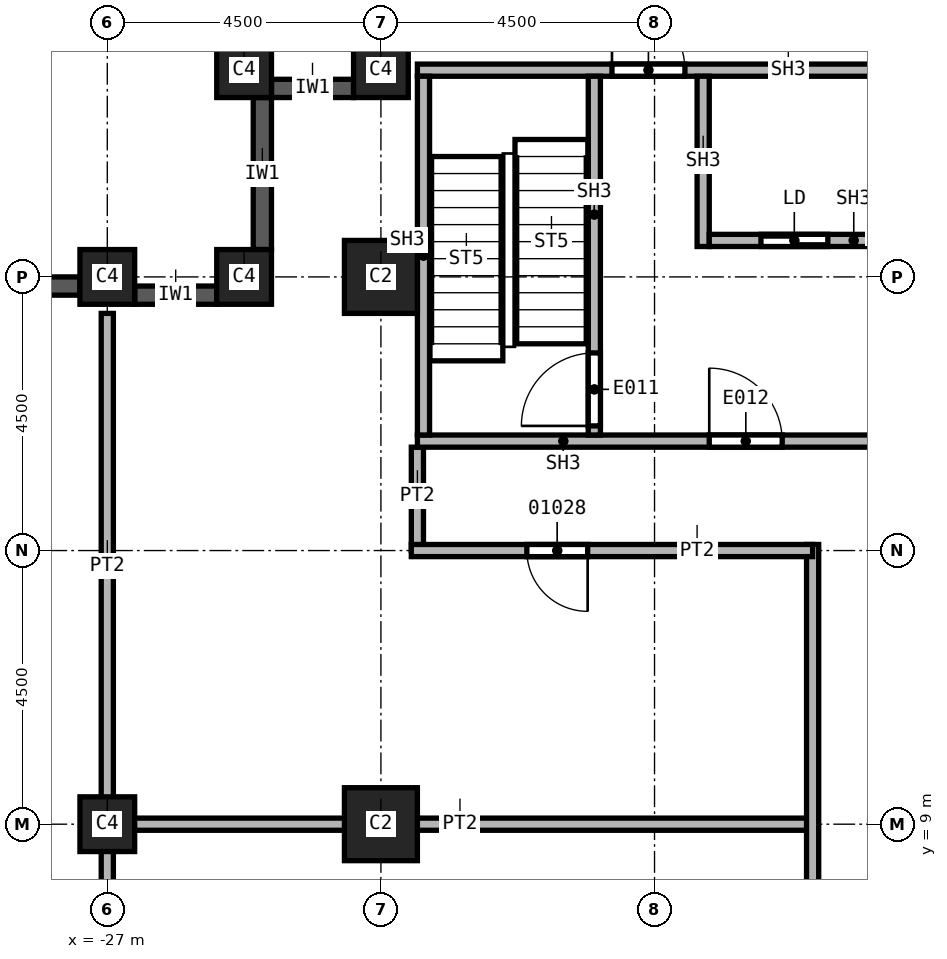
"""IFC4 building model, lengths in metres.
Left out: names, types, materials, properties, quantities, classifications, styles, units other than length and angle.
Written with IfcOpenShell. Run it as: python <this file> out.ifc"""

import sys

from ifc_helpers import new_model, si_unit, direction, frame, frame_2d, origin, origin_2d, place, context, subcontext, project, spatial, rectangle, extrude, element, fill, save


model = new_model("IFC4")
c1 = context("Model", 3, precision=1e-05, world=origin(), true_north=direction((0.0, 1.0)))
c2 = subcontext(c1, "Body", "Model", "MODEL_VIEW")
j1 = project(units=[si_unit("LENGTHUNIT", "METRE"), si_unit("PLANEANGLEUNIT", "RADIAN")], contexts=[c1])
p1 = place(None, origin())
s1 = spatial("IfcSite", under=j1, at=p1, CompositionType="ELEMENT")
p2 = place(p1, origin())
s2 = spatial("IfcBuilding", under=s1, at=p2, CompositionType="ELEMENT")
p3 = place(p2, frame((0.0, 0.0, 68.0)))
s3 = spatial("IfcBuildingStorey", under=s2, at=p3, CompositionType="ELEMENT", Elevation=68.0)
for number, where, z_axis, x_axis in (
    (1, (-22.5, 9.0, 0.0), (0.0, 0.0, 1.0), (1.0, 0.0, 0.0)),
    (2, (-22.5, 18.0, 0.0), (0.0, 0.0, 1.0), (1.0, 0.0, 0.0)),
):
    element("IfcColumn", number, at=place(p3, frame(where, z_axis=z_axis, x_axis=x_axis)), inside=s3, PredefinedType="COLUMN", context=c2, shape_type="SweptSolid", body=[
        extrude(rectangle(XDim=1.2, YDim=1.2, at=origin_2d()), origin(), (0.0, 0.0, 1.0), 3.7),
    ])
for number, where, z_axis, x_axis in (
    (3, (-27.0, 9.0, 0.0), (0.0, 0.0, 1.0), (1.0, 0.0, 0.0)),
    (4, (-27.0, 18.0, 0.0), (0.0, 0.0, 1.0), (1.0, 0.0, 0.0)),
    (5, (-22.5, 21.4, 0.0), (0.0, 0.0, 1.0), (1.0, 0.0, 0.0)),
    (6, (-24.75, 21.4, 0.0), (0.0, 0.0, 1.0), (1.0, 0.0, 0.0)),
    (7, (-24.75, 18.0, 0.0), (0.0, 0.0, 1.0), (1.0, 0.0, 0.0)),
):
    element("IfcColumn", number, at=place(p3, frame(where, z_axis=z_axis, x_axis=x_axis)), inside=s3, PredefinedType="COLUMN", context=c2, shape_type="SweptSolid", body=[
        extrude(rectangle(XDim=0.9, YDim=0.9, at=origin_2d()), origin(), (0.0, 0.0, 1.0), 3.7),
    ])
p4 = place(p3, frame((-22.95, 21.1, 0.0), z_axis=(0.0, 0.0, 1.0), x_axis=(-1.0, 0.0, 0.0)))
e8 = element("IfcWall", 8, at=p4, inside=s3, PredefinedType="SOLIDWALL", context=c2, shape_type="SweptSolid", body=[
    extrude(rectangle(XDim=1.35, YDim=0.3, at=frame_2d((0.675, 0.0))), origin(), (0.0, 0.0, 1.0), 3.1),
])
p5 = place(p3, frame((-24.45, 20.95, 0.0), z_axis=(0.0, 0.0, 1.0), x_axis=(0.0, -1.0, 0.0)))
e9 = element("IfcWall", 9, at=p5, inside=s3, PredefinedType="SOLIDWALL", context=c2, shape_type="SweptSolid", body=[
    extrude(rectangle(XDim=2.5, YDim=0.3, at=frame_2d((1.25, 0.0))), origin(), (0.0, 0.0, 1.0), 3.1),
])
p6 = place(p3, frame((-25.2, 17.7, 0.0), z_axis=(0.0, 0.0, 1.0), x_axis=(-1.0, 0.0, 0.0)))
e10 = element("IfcWall", 10, at=p6, inside=s3, PredefinedType="SOLIDWALL", context=c2, shape_type="SweptSolid", body=[
    extrude(rectangle(XDim=1.35, YDim=0.3, at=frame_2d((0.675, 0.0))), origin(), (0.0, 0.0, 1.0), 3.1),
])
p7 = place(p3, frame((-27.45, 17.85, 0.0), z_axis=(0.0, 0.0, 1.0), x_axis=(-1.0, 0.0, 0.0)))
e11 = element("IfcWall", 11, at=p7, inside=s3, PredefinedType="SOLIDWALL", context=c2, shape_type="SweptSolid", body=[
    extrude(rectangle(XDim=3.6, YDim=0.3, at=frame_2d((1.8, 0.0))), origin(), (0.0, 0.0, 1.0), 3.1),
])
p8 = place(p7, frame((0.6, 0.0, 0.8)))
e12 = element("IfcOpeningElement", 12, at=p8, cuts=e11, PredefinedType="OPENING", context=c2, shape_type="SweptSolid", body=[
    extrude(rectangle(XDim=2.4, YDim=1.95, at=frame_2d((1.2, 0.975))), frame((0.0, 0.15, 0.0), z_axis=(0.0, -1.0, 0.0), x_axis=(1.0, 0.0, 0.0)), (0.0, 0.0, 1.0), 0.3),
])
p9 = place(p3, frame((-27.1, 9.0, 0.0), z_axis=(0.0, 0.0, 1.0), x_axis=(1.0, 0.0, 0.0)))
e13 = element("IfcWall", 13, at=p9, inside=s3, PredefinedType="PARTITIONING", context=c2, shape_type="SweptSolid", body=[
    extrude(rectangle(XDim=11.7, YDim=0.2, at=frame_2d((5.85, 0.0))), origin(), (0.0, 0.0, 1.0), 3.7),
])
p10 = place(p3, frame((-27.0, 3.75, 0.0), z_axis=(0.0, 0.0, 1.0), x_axis=(0.0, 1.0, 0.0)))
e14 = element("IfcWall", 14, at=p10, inside=s3, PredefinedType="PARTITIONING", context=c2, shape_type="SweptSolid", body=[
    extrude(rectangle(XDim=13.65, YDim=0.2, at=frame_2d((6.825, 0.0))), origin(), (0.0, 0.0, 1.0), 3.7),
])
p11 = place(p3, frame((-21.9, 13.5, 0.0), z_axis=(0.0, 0.0, 1.0), x_axis=(0.0, 1.0, 0.0)))
e15 = element("IfcWall", 15, at=p11, inside=s3, PredefinedType="PARTITIONING", context=c2, shape_type="SweptSolid", body=[
    extrude(rectangle(XDim=1.7, YDim=0.2, at=frame_2d((0.85, 0.0))), origin(), (0.0, 0.0, 1.0), 3.7),
])
p12 = place(p3, frame((-15.4, 3.65, 0.0), z_axis=(0.0, 0.0, 1.0), x_axis=(0.0, 1.0, 0.0)))
e16 = element("IfcWall", 16, at=p12, inside=s3, PredefinedType="PARTITIONING", context=c2, shape_type="SweptSolid", body=[
    extrude(rectangle(XDim=9.95, YDim=0.2, at=frame_2d((4.975, 0.0))), origin(), (0.0, 0.0, 1.0), 3.7),
])
p13 = place(p3, frame((-15.4, 13.5, 0.0), z_axis=(0.0, 0.0, 1.0), x_axis=(-1.0, 0.0, 0.0)))
e17 = element("IfcWall", 17, at=p13, inside=s3, PredefinedType="PARTITIONING", context=c2, shape_type="SweptSolid", body=[
    extrude(rectangle(XDim=6.6, YDim=0.2, at=frame_2d((3.3, 0.0))), origin(), (0.0, 0.0, 1.0), 3.7),
])
p14 = place(p13, frame((3.7, 0.0, 0.0)))
e18 = element("IfcOpeningElement", 18, at=p14, cuts=e17, PredefinedType="OPENING", context=c2, shape_type="SweptSolid", body=[
    extrude(rectangle(XDim=1.0, YDim=2.1, at=frame_2d((0.5, 1.05))), frame((0.0, 0.1, 0.0), z_axis=(0.0, -1.0, 0.0), x_axis=(1.0, 0.0, 0.0)), (0.0, 0.0, 1.0), 0.2),
])
p15 = place(p3, frame((-21.9, 15.3, 0.0), z_axis=(0.0, 0.0, 1.0), x_axis=(1.0, 0.0, 0.0)))
e19 = element("IfcWall", 19, at=p15, inside=s3, PredefinedType="SOLIDWALL", context=c2, shape_type="SweptSolid", body=[
    extrude(rectangle(XDim=8.275, YDim=0.2, at=frame_2d((4.137, 0.0))), origin(), (0.0, 0.0, 1.0), 3.7),
])
p16 = place(p15, frame((4.8, 0.0, 0.0)))
e20 = element("IfcOpeningElement", 20, at=p16, cuts=e19, PredefinedType="OPENING", context=c2, shape_type="SweptSolid", body=[
    extrude(rectangle(XDim=1.2, YDim=2.1, at=frame_2d((0.6, 1.05))), frame((0.0, 0.1, 0.0), z_axis=(0.0, -1.0, 0.0), x_axis=(1.0, 0.0, 0.0)), (0.0, 0.0, 1.0), 0.2),
])
p17 = place(p3, frame((-21.9, 21.4, 0.0), z_axis=(0.0, 0.0, 1.0), x_axis=(1.0, 0.0, 0.0)))
e21 = element("IfcWall", 21, at=p17, inside=s3, PredefinedType="SOLIDWALL", context=c2, shape_type="SweptSolid", body=[
    extrude(rectangle(XDim=7.8, YDim=0.2, at=frame_2d((3.9, 0.0))), origin(), (0.0, 0.0, 1.0), 3.7),
])
p18 = place(p17, frame((3.2, 0.0, 0.0)))
e22 = element("IfcOpeningElement", 22, at=p18, cuts=e21, PredefinedType="OPENING", context=c2, shape_type="SweptSolid", body=[
    extrude(rectangle(XDim=1.2, YDim=2.1, at=frame_2d((0.6, 1.05))), frame((0.0, 0.1, 0.0), z_axis=(0.0, -1.0, 0.0), x_axis=(1.0, 0.0, 0.0)), (0.0, 0.0, 1.0), 0.2),
])
p19 = place(p3, frame((-21.8, 15.4, 0.0), z_axis=(0.0, 0.0, 1.0), x_axis=(0.0, 1.0, 0.0)))
e23 = element("IfcWall", 23, at=p19, inside=s3, PredefinedType="SOLIDWALL", context=c2, shape_type="SweptSolid", body=[
    extrude(rectangle(XDim=5.9, YDim=0.2, at=frame_2d((2.95, 0.0))), origin(), (0.0, 0.0, 1.0), 3.7),
])
p20 = place(p3, frame((-18.99, 15.4, 0.0), z_axis=(0.0, 0.0, 1.0), x_axis=(0.0, 1.0, 0.0)))
e24 = element("IfcWall", 24, at=p20, inside=s3, PredefinedType="SOLIDWALL", context=c2, shape_type="SweptSolid", body=[
    extrude(rectangle(XDim=5.9, YDim=0.2, at=frame_2d((2.95, 0.0))), origin(), (0.0, 0.0, 1.0), 3.7),
])
p21 = place(p20, frame((0.15, 0.0, 0.0)))
e25 = element("IfcOpeningElement", 25, at=p21, cuts=e24, PredefinedType="OPENING", context=c2, shape_type="SweptSolid", body=[
    extrude(rectangle(XDim=1.2, YDim=2.1, at=frame_2d((0.6, 1.05))), frame((0.0, 0.1, 0.0), z_axis=(0.0, -1.0, 0.0), x_axis=(1.0, 0.0, 0.0)), (0.0, 0.0, 1.0), 0.2),
])
p22 = place(p3, frame((-17.2, 18.5, 0.0), z_axis=(0.0, 0.0, 1.0), x_axis=(0.0, 1.0, 0.0)))
e26 = element("IfcWall", 26, at=p22, inside=s3, PredefinedType="SOLIDWALL", context=c2, shape_type="SweptSolid", body=[
    extrude(rectangle(XDim=2.8, YDim=0.2, at=frame_2d((1.4, 0.0))), origin(), (0.0, 0.0, 1.0), 3.7),
])
p23 = place(p3, frame((-17.1, 18.6, 0.0), z_axis=(0.0, 0.0, 1.0), x_axis=(1.0, 0.0, 0.0)))
e27 = element("IfcWall", 27, at=p23, inside=s3, PredefinedType="SOLIDWALL", context=c2, shape_type="SweptSolid", body=[
    extrude(rectangle(XDim=2.8, YDim=0.2, at=frame_2d((1.4, 0.0))), origin(), (0.0, 0.0, 1.0), 3.7),
])
p24 = place(p23, frame((0.85, 0.0, 0.0)))
e28 = element("IfcOpeningElement", 28, at=p24, cuts=e27, PredefinedType="OPENING", context=c2, shape_type="SweptSolid", body=[
    extrude(rectangle(XDim=1.1, YDim=2.1, at=frame_2d((0.55, 1.05))), frame((0.0, 0.1, 0.0), z_axis=(0.0, -1.0, 0.0), x_axis=(1.0, 0.0, 0.0)), (0.0, 0.0, 1.0), 0.2),
])
p25 = place(p14, origin())
e29 = element("IfcDoor", 29, at=p25, inside=s3, OperationType="SINGLE_SWING_LEFT", PredefinedType="DOOR", context=c2, shape_type="SweptSolid", body=[
    extrude(rectangle(XDim=1.0, YDim=2.1, at=frame_2d((0.5, 1.05))), frame((0.0, 0.025, 0.0), z_axis=(0.0, -1.0, 0.0), x_axis=(1.0, 0.0, 0.0)), (0.0, 0.0, 1.0), 0.05),
])
fill(e18, e29)
p26 = place(p21, origin())
e30 = element("IfcDoor", 30, at=p26, inside=s3, OperationType="SINGLE_SWING_LEFT", PredefinedType="DOOR", context=c2, shape_type="SweptSolid", body=[
    extrude(rectangle(XDim=1.2, YDim=2.1, at=frame_2d((0.6, 1.05))), frame((0.0, 0.025, 0.0), z_axis=(0.0, -1.0, 0.0), x_axis=(1.0, 0.0, 0.0)), (0.0, 0.0, 1.0), 0.05),
])
fill(e25, e30)
p27 = place(p24, origin())
e31 = element("IfcDoor", 31, at=p27, inside=s3, OperationType="SLIDING_TO_LEFT", PredefinedType="DOOR", context=c2, shape_type="SweptSolid", body=[
    extrude(rectangle(XDim=1.1, YDim=2.1, at=frame_2d((0.55, 1.05))), frame((0.0, 0.025, 0.0), z_axis=(0.0, -1.0, 0.0), x_axis=(1.0, 0.0, 0.0)), (0.0, 0.0, 1.0), 0.05),
])
fill(e28, e31)
p28 = place(p16, origin())
e32 = element("IfcDoor", 32, at=p28, inside=s3, OperationType="SINGLE_SWING_RIGHT", PredefinedType="DOOR", context=c2, shape_type="SweptSolid", body=[
    extrude(rectangle(XDim=1.2, YDim=2.1, at=frame_2d((0.6, 1.05))), frame((0.0, 0.025, 0.0), z_axis=(0.0, -1.0, 0.0), x_axis=(1.0, 0.0, 0.0)), (0.0, 0.0, 1.0), 0.05),
])
fill(e20, e32)
p29 = place(p18, origin())
e33 = element("IfcDoor", 33, at=p29, inside=s3, OperationType="SINGLE_SWING_LEFT", PredefinedType="DOOR", context=c2, shape_type="SweptSolid", body=[
    extrude(rectangle(XDim=1.2, YDim=2.1, at=frame_2d((0.6, 1.05))), frame((0.0, 0.025, 0.0), z_axis=(0.0, -1.0, 0.0), x_axis=(1.0, 0.0, 0.0)), (0.0, 0.0, 1.0), 0.05),
])
fill(e22, e33)
save(model, sys.argv[1])
